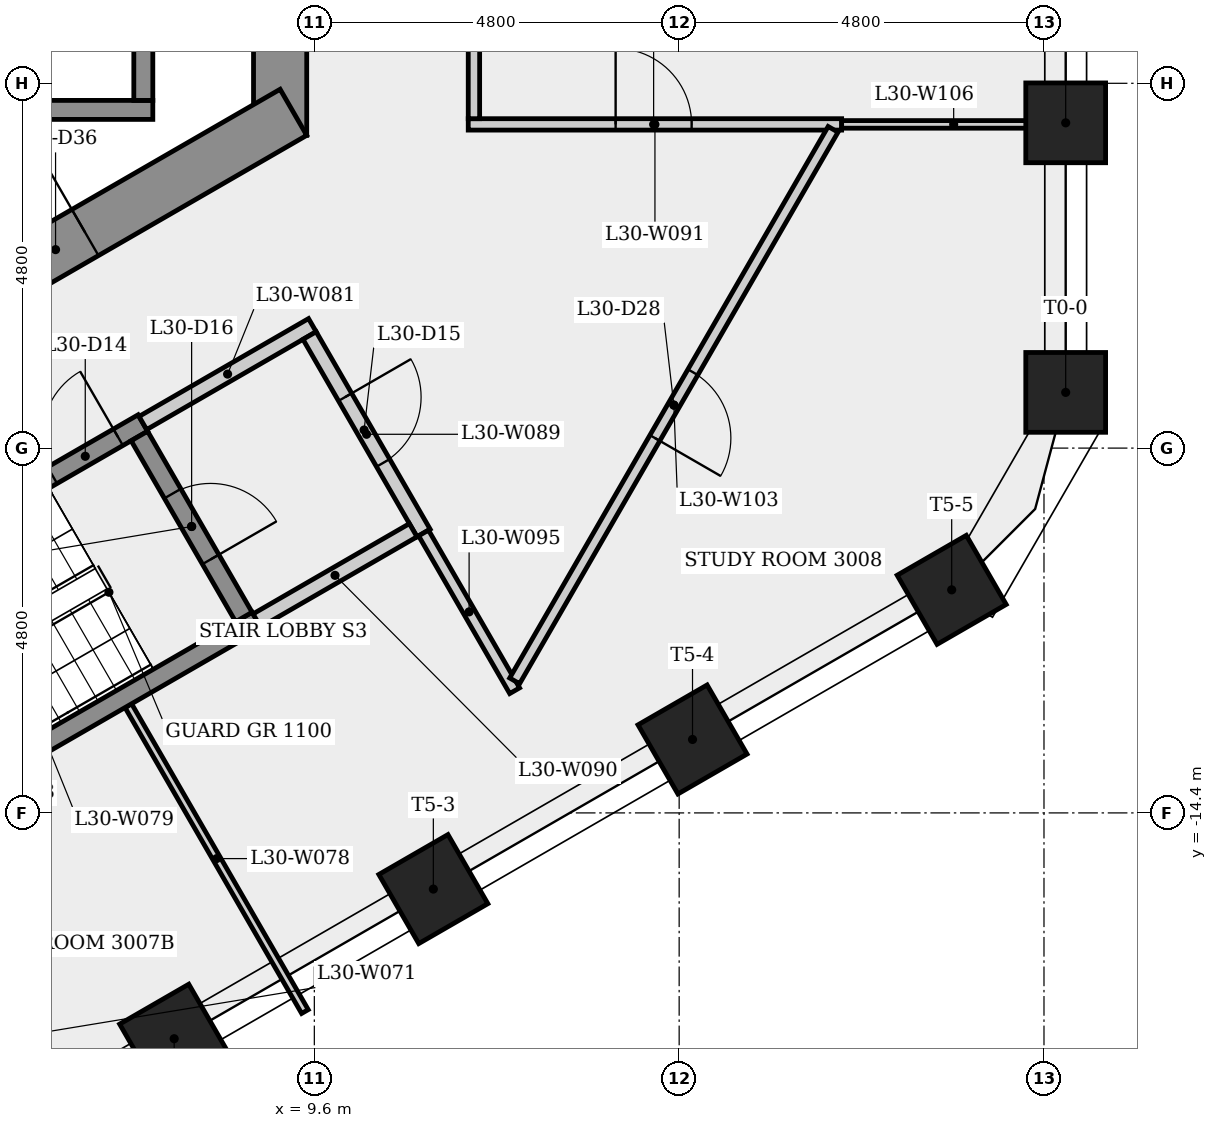
"""IFC4 building model, lengths in metres.
Left out: names, types, materials, properties, quantities, classifications, styles, units other than length and angle.
Written with IfcOpenShell. Run it as: python <this file> out.ifc"""

import sys

from ifc_helpers import new_model, si_unit, direction, frame, frame_2d, origin, origin_2d, place, context, subcontext, project, spatial, rectangle, extrude, element, fill, save


model = new_model("IFC4")
c1 = context("Model", 3, precision=1e-05, world=origin(), true_north=direction((0.0, 1.0)))
c2 = subcontext(c1, "Body", "Model", "MODEL_VIEW")
j1 = project(units=[si_unit("LENGTHUNIT", "METRE"), si_unit("PLANEANGLEUNIT", "RADIAN")], contexts=[c1])
p1 = place(None, origin())
s1 = spatial("IfcSite", under=j1, at=p1, CompositionType="ELEMENT")
p2 = place(p1, origin())
s2 = spatial("IfcBuilding", under=s1, at=p2, CompositionType="ELEMENT")
p3 = place(p2, frame((0.0, 0.0, 113.7)))
s3 = spatial("IfcBuildingStorey", under=s2, at=p3, CompositionType="ELEMENT", Elevation=113.7)
p4 = place(p3, frame((9.15, -5.485, 0.0), z_axis=(0.0, 0.0, 1.0), x_axis=(0.0, 1.0, 0.0)))
e1 = element("IfcWall", 1, at=p4, inside=s3, PredefinedType="SHEAR", context=c2, shape_type="SweptSolid", body=[
    extrude(rectangle(XDim=10.97, YDim=0.7, at=frame_2d((5.485, 0.0))), origin(), (0.0, 0.0, 1.0), 3.4),
])
p5 = place(p4, frame((4.685, 0.0, 0.0)))
e2 = element("IfcOpeningElement", 2, at=p5, cuts=e1, PredefinedType="OPENING", context=c2, shape_type="SweptSolid", body=[
    extrude(rectangle(XDim=1.6, YDim=2.1, at=frame_2d((0.8, 1.05))), frame((0.0, 0.36, 0.0), z_axis=(0.0, -1.0, 0.0), x_axis=(1.0, 0.0, 0.0)), (0.0, 0.0, 1.0), 0.72),
])
p6 = place(p3, frame((-0.175, -10.667, 0.0), z_axis=(0.0, 0.0, 1.0), x_axis=(0.866023993627, 0.500002442456, 0.0)))
e3 = element("IfcWall", 3, at=p6, inside=s3, PredefinedType="SHEAR", context=c2, shape_type="SweptSolid", body=[
    extrude(rectangle(XDim=10.97, YDim=0.7, at=frame_2d((5.485, 0.0))), origin(), (0.0, 0.0, 1.0), 3.4),
])
p7 = place(p6, frame((6.906, 0.0, 0.0)))
e4 = element("IfcOpeningElement", 4, at=p7, cuts=e3, PredefinedType="OPENING", context=c2, shape_type="SweptSolid", body=[
    extrude(rectangle(XDim=0.9, YDim=2.1, at=frame_2d((0.45, 1.05))), frame((0.0, 0.36, 0.0), z_axis=(0.0, -1.0, 0.0), x_axis=(1.0, 0.0, 0.0)), (0.0, 0.0, 1.0), 0.72),
])
for number, where, z_axis, x_axis in (
    (5, (19.486, -8.867, 0.0), (0.0, 0.0, 1.0), (1.0, 0.0, 0.0)),
    (6, (19.486, -5.32, 0.0), (0.0, 0.0, 1.0), (1.0, 0.0, 0.0)),
    (7, (7.756, -17.371, 0.0), (0.0, 0.0, 1.0), (0.5, -0.866, 0.0)),
    (8, (11.166, -15.402, 0.0), (0.0, 0.0, 1.0), (0.5, -0.866, 0.0)),
    (9, (14.576, -13.434, 0.0), (0.0, 0.0, 1.0), (0.5, -0.866, 0.0)),
    (10, (17.986, -11.465, 0.0), (0.0, 0.0, 1.0), (0.5, -0.866, 0.0)),
):
    element("IfcColumn", number, at=place(p3, frame(where, z_axis=z_axis, x_axis=x_axis)), inside=s3, PredefinedType="COLUMN", context=c2, shape_type="SweptSolid", body=[
        extrude(rectangle(XDim=1.05, YDim=1.05, at=origin_2d()), origin(), (0.0, 0.0, 1.0), 3.4),
    ])
p8 = place(p3, frame((-7.225, -5.15, 0.0), z_axis=(0.0, 0.0, 1.0), x_axis=(1.0, 0.0, 0.0)))
e11 = element("IfcWall", 11, at=p8, inside=s3, PredefinedType="SHEAR", context=c2, shape_type="SweptSolid", body=[
    extrude(rectangle(XDim=14.7, YDim=0.25, at=frame_2d((7.35, 0.0))), origin(), (0.0, 0.0, 1.0), 3.05),
])
p9 = place(p3, frame((1.585, -12.595, 0.0), z_axis=(0.0, 0.0, 1.0), x_axis=(0.866036417653, 0.499980922934, 0.0)))
e12 = element("IfcWall", 12, at=p9, inside=s3, PredefinedType="SHEAR", context=c2, shape_type="SweptSolid", body=[
    extrude(rectangle(XDim=6.65, YDim=0.25, at=frame_2d((3.325, 0.0))), origin(), (0.0, 0.0, 1.0), 3.05),
])
p10 = place(p9, frame((5.275, 0.0, 0.0)))
e13 = element("IfcOpeningElement", 13, at=p10, cuts=e12, PredefinedType="OPENING", context=c2, shape_type="SweptSolid", body=[
    extrude(rectangle(XDim=1.0, YDim=2.1, at=frame_2d((0.5, 1.05))), frame((0.0, 0.135, 0.0), z_axis=(0.0, -1.0, 0.0), x_axis=(1.0, 0.0, 0.0)), (0.0, 0.0, 1.0), 0.27),
])
p11 = place(p3, frame((7.153, -12.989, 0.0), z_axis=(0.0, 0.0, 1.0), x_axis=(0.499992256698, -0.866029874336, 0.0)))
e14 = element("IfcWall", 14, at=p11, inside=s3, PredefinedType="PARTITIONING", context=c2, shape_type="SweptSolid", body=[
    extrude(rectangle(XDim=4.647, YDim=0.1, at=frame_2d((2.324, 0.0))), origin(), (0.0, 0.0, 1.0), 3.05),
])
p12 = place(p3, frame((3.301, -15.068, 0.0), z_axis=(0.0, 0.0, 1.0), x_axis=(0.866035036182, 0.499983315828, 0.0)))
e15 = element("IfcWall", 15, at=p12, inside=s3, PredefinedType="SHEAR", context=c2, shape_type="SweptSolid", body=[
    extrude(rectangle(XDim=6.4, YDim=0.25, at=frame_2d((3.2, 0.0))), origin(), (0.0, 0.0, 1.0), 3.05),
])
p13 = place(p3, frame((7.298, -9.441, 0.0), z_axis=(0.0, 0.0, 1.0), x_axis=(0.500034990121, -0.866005201286, 0.0)))
e16 = element("IfcWall", 16, at=p13, inside=s3, PredefinedType="SHEAR", context=c2, shape_type="SweptSolid", body=[
    extrude(rectangle(XDim=2.75, YDim=0.25, at=frame_2d((1.375, 0.0))), origin(), (0.0, 0.0, 1.0), 3.05),
])
p14 = place(p13, frame((0.875, 0.0, 0.0)))
e17 = element("IfcOpeningElement", 17, at=p14, cuts=e16, PredefinedType="OPENING", context=c2, shape_type="SweptSolid", body=[
    extrude(rectangle(XDim=1.0, YDim=2.1, at=frame_2d((0.5, 1.05))), frame((0.0, 0.135, 0.0), z_axis=(0.0, -1.0, 0.0), x_axis=(1.0, 0.0, 0.0)), (0.0, 0.0, 1.0), 0.27),
])
p15 = place(p3, frame((7.344, -9.27, 0.0), z_axis=(0.0, 0.0, 1.0), x_axis=(0.866005588531, 0.500034319456, 0.0)))
e18 = element("IfcWall", 18, at=p15, inside=s3, PredefinedType="PARTITIONING", context=c2, shape_type="SweptSolid", body=[
    extrude(rectangle(XDim=2.575, YDim=0.2, at=frame_2d((1.288, 0.0))), origin(), (0.0, 0.0, 1.0), 3.05),
])
p16 = place(p3, frame((7.35, -1.925, 0.0), z_axis=(0.0, 0.0, 1.0), x_axis=(0.0, -1.0, 0.0)))
e19 = element("IfcWall", 19, at=p16, inside=s3, PredefinedType="SHEAR", context=c2, shape_type="SweptSolid", body=[
    extrude(rectangle(XDim=3.1, YDim=0.25, at=frame_2d((1.55, 0.0))), origin(), (0.0, 0.0, 1.0), 3.4),
])
p17 = place(p3, frame((9.537, -8.119, 0.0), z_axis=(0.0, 0.0, 1.0), x_axis=(0.499990139034, -0.866031096941, 0.0)))
e20 = element("IfcWall", 20, at=p17, inside=s3, PredefinedType="PARTITIONING", context=c2, shape_type="SweptSolid", body=[
    extrude(rectangle(XDim=3.0, YDim=0.2, at=frame_2d((1.5, 0.0))), origin(), (0.0, 0.0, 1.0), 3.05),
])
p18 = place(p17, frame((0.935, 0.0, 0.0)))
e21 = element("IfcOpeningElement", 21, at=p18, cuts=e20, PredefinedType="OPENING", context=c2, shape_type="SweptSolid", body=[
    extrude(rectangle(XDim=1.0, YDim=2.1, at=frame_2d((0.5, 1.05))), frame((0.0, 0.11, 0.0), z_axis=(0.0, -1.0, 0.0), x_axis=(1.0, 0.0, 0.0)), (0.0, 0.0, 1.0), 0.22),
])
p19 = place(p3, frame((10.901, -10.681, 0.0), z_axis=(0.0, 0.0, 1.0), x_axis=(-0.866007538022, -0.500030943131, 0.0)))
e22 = element("IfcWall", 22, at=p19, inside=s3, PredefinedType="PARTITIONING", context=c2, shape_type="SweptSolid", body=[
    extrude(rectangle(XDim=2.375, YDim=0.2, at=frame_2d((1.188, 0.0))), origin(), (0.0, 0.0, 1.0), 3.05),
])
p20 = place(p3, frame((11.625, -5.341, 0.0), z_axis=(0.0, 0.0, 1.0), x_axis=(1.0, 0.0, 0.0)))
e23 = element("IfcWall", 23, at=p20, inside=s3, PredefinedType="PARTITIONING", context=c2, shape_type="SweptSolid", body=[
    extrude(rectangle(XDim=4.913, YDim=0.15, at=frame_2d((2.457, 0.0))), origin(), (0.0, 0.0, 1.0), 3.05),
])
p21 = place(p20, frame((1.939, 0.0, 0.0)))
e24 = element("IfcOpeningElement", 24, at=p21, cuts=e23, PredefinedType="OPENING", context=c2, shape_type="SweptSolid", body=[
    extrude(rectangle(XDim=1.0, YDim=2.1, at=frame_2d((0.5, 1.05))), frame((0.0, 0.085, 0.0), z_axis=(0.0, -1.0, 0.0), x_axis=(1.0, 0.0, 0.0)), (0.0, 0.0, 1.0), 0.17),
])
p22 = place(p3, frame((11.7, -5.266, 0.0), z_axis=(0.0, 0.0, 1.0), x_axis=(0.0, 1.0, 0.0)))
e25 = element("IfcWall", 25, at=p22, inside=s3, PredefinedType="PARTITIONING", context=c2, shape_type="SweptSolid", body=[
    extrude(rectangle(XDim=10.431, YDim=0.15, at=frame_2d((5.216, 0.0))), origin(), (0.0, 0.0, 1.0), 3.05),
])
p23 = place(p22, frame((6.899, 0.0, 0.0)))
e26 = element("IfcOpeningElement", 26, at=p23, cuts=e25, PredefinedType="OPENING", context=c2, shape_type="SweptSolid", body=[
    extrude(rectangle(XDim=1.0, YDim=2.1, at=frame_2d((0.5, 1.05))), frame((0.0, 0.085, 0.0), z_axis=(0.0, -1.0, 0.0), x_axis=(1.0, 0.0, 0.0)), (0.0, 0.0, 1.0), 0.17),
])
p24 = place(p3, frame((12.236, -12.792, 0.0), z_axis=(0.0, 0.0, 1.0), x_axis=(-0.499995825336, 0.866027814014, 0.0)))
e27 = element("IfcWall", 27, at=p24, inside=s3, PredefinedType="PARTITIONING", context=c2, shape_type="SweptSolid", body=[
    extrude(rectangle(XDim=2.396, YDim=0.15, at=frame_2d((1.198, 0.0))), origin(), (0.0, 0.0, 1.0), 3.05),
])
p25 = place(p3, frame((16.425, -5.406, 0.0), z_axis=(0.0, 0.0, 1.0), x_axis=(-0.499996516801, -0.866027414801, 0.0)))
e28 = element("IfcWall", 28, at=p25, inside=s3, PredefinedType="PARTITIONING", context=c2, shape_type="SweptSolid", body=[
    extrude(rectangle(XDim=8.379, YDim=0.15, at=frame_2d((4.19, 0.0))), origin(), (0.0, 0.0, 1.0), 3.05),
])
p26 = place(p25, frame((3.69, 0.0, 0.0)))
e29 = element("IfcOpeningElement", 29, at=p26, cuts=e28, PredefinedType="OPENING", context=c2, shape_type="SweptSolid", body=[
    extrude(rectangle(XDim=1.0, YDim=2.1, at=frame_2d((0.5, 1.05))), frame((0.0, 0.085, 0.0), z_axis=(0.0, -1.0, 0.0), x_axis=(1.0, 0.0, 0.0)), (0.0, 0.0, 1.0), 0.17),
])
p27 = place(p3, frame((19.486, -5.341, 0.0), z_axis=(0.0, 0.0, 1.0), x_axis=(-1.0, 0.0, 0.0)))
e30 = element("IfcWall", 30, at=p27, inside=s3, PredefinedType="PARTITIONING", context=c2, shape_type="SweptSolid", body=[
    extrude(rectangle(XDim=2.948, YDim=0.1, at=frame_2d((1.474, 0.0))), origin(), (0.0, 0.0, 1.0), 3.05),
])
p28 = place(p10, origin())
e31 = element("IfcDoor", 31, at=p28, inside=s3, OperationType="SINGLE_SWING_RIGHT", PredefinedType="DOOR", context=c2, shape_type="SweptSolid", body=[
    extrude(rectangle(XDim=1.0, YDim=2.1, at=frame_2d((0.5, 1.05))), frame((0.0, 0.025, 0.0), z_axis=(0.0, -1.0, 0.0), x_axis=(1.0, 0.0, 0.0)), (0.0, 0.0, 1.0), 0.05),
])
fill(e13, e31)
p29 = place(p18, origin())
e32 = element("IfcDoor", 32, at=p29, inside=s3, OperationType="SINGLE_SWING_LEFT", PredefinedType="DOOR", context=c2, shape_type="SweptSolid", body=[
    extrude(rectangle(XDim=1.0, YDim=2.1, at=frame_2d((0.5, 1.05))), frame((0.0, 0.025, 0.0), z_axis=(0.0, -1.0, 0.0), x_axis=(1.0, 0.0, 0.0)), (0.0, 0.0, 1.0), 0.05),
])
fill(e21, e32)
p30 = place(p14, origin())
e33 = element("IfcDoor", 33, at=p30, inside=s3, OperationType="SINGLE_SWING_RIGHT", PredefinedType="DOOR", context=c2, shape_type="SweptSolid", body=[
    extrude(rectangle(XDim=1.0, YDim=2.1, at=frame_2d((0.5, 1.05))), frame((0.0, 0.025, 0.0), z_axis=(0.0, -1.0, 0.0), x_axis=(1.0, 0.0, 0.0)), (0.0, 0.0, 1.0), 0.05),
])
fill(e17, e33)
p31 = place(p21, origin())
e34 = element("IfcDoor", 34, at=p31, inside=s3, OperationType="SINGLE_SWING_LEFT", PredefinedType="DOOR", context=c2, shape_type="SweptSolid", body=[
    extrude(rectangle(XDim=1.0, YDim=2.1, at=frame_2d((0.5, 1.05))), frame((0.0, 0.025, 0.0), z_axis=(0.0, -1.0, 0.0), x_axis=(1.0, 0.0, 0.0)), (0.0, 0.0, 1.0), 0.05),
])
fill(e24, e34)
p32 = place(p26, origin())
e35 = element("IfcDoor", 35, at=p32, inside=s3, OperationType="SINGLE_SWING_RIGHT", PredefinedType="DOOR", context=c2, shape_type="SweptSolid", body=[
    extrude(rectangle(XDim=1.0, YDim=2.1, at=frame_2d((0.5, 1.05))), frame((0.0, 0.025, 0.0), z_axis=(0.0, -1.0, 0.0), x_axis=(1.0, 0.0, 0.0)), (0.0, 0.0, 1.0), 0.05),
])
fill(e29, e35)
p33 = place(p7, origin())
e36 = element("IfcDoor", 36, at=p33, inside=s3, OperationType="SINGLE_SWING_RIGHT", PredefinedType="DOOR", context=c2, shape_type="SweptSolid", body=[
    extrude(rectangle(XDim=0.9, YDim=2.1, at=frame_2d((0.45, 1.05))), frame((0.0, 0.025, 0.0), z_axis=(0.0, -1.0, 0.0), x_axis=(1.0, 0.0, 0.0)), (0.0, 0.0, 1.0), 0.05),
])
fill(e4, e36)
save(model, sys.argv[1])
